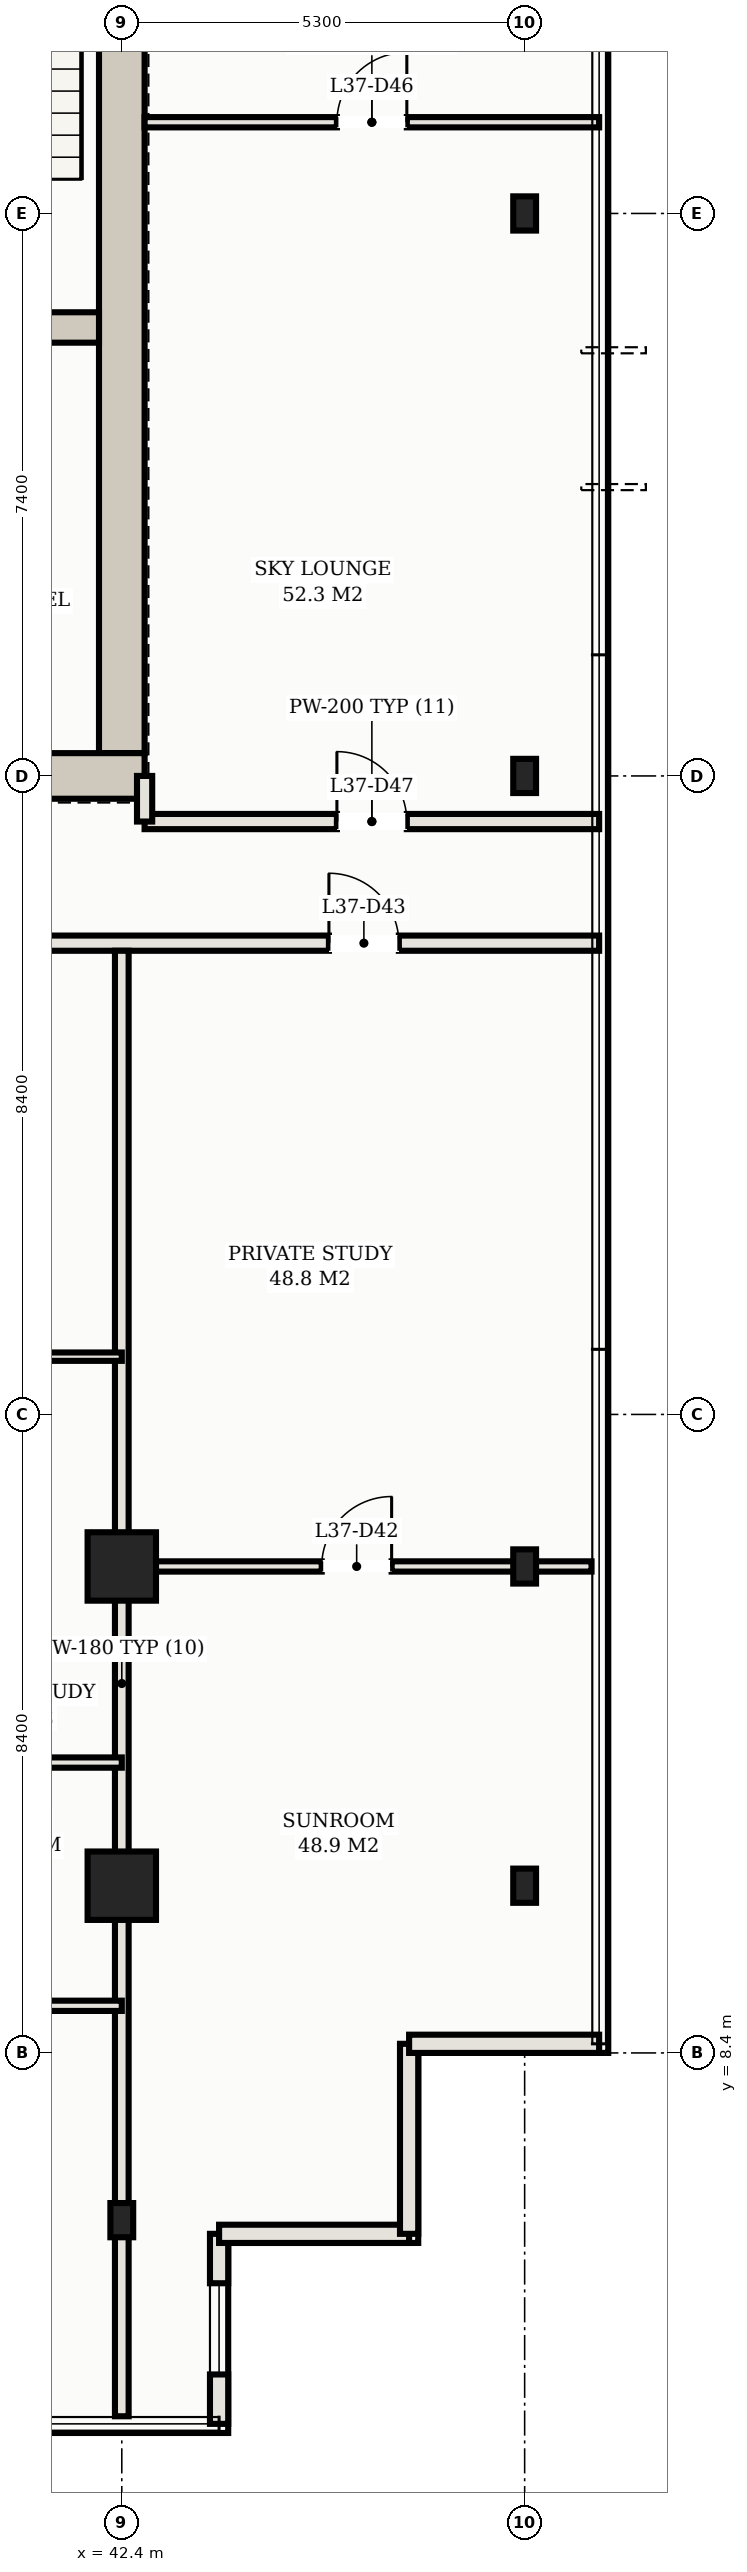
"""IFC4 building model, lengths in metres.
Left out: names, types, materials, properties, quantities, classifications, styles, units other than length and angle.
Written with IfcOpenShell. Run it as: python <this file> out.ifc"""

import sys

from ifc_helpers import new_model, si_unit, direction, frame, frame_2d, origin, origin_2d, place, context, subcontext, project, spatial, rectangle, hollow_rectangle, extrude, element, fill, save


model = new_model("IFC4")
c1 = context("Model", 3, precision=1e-05, world=origin(), true_north=direction((0.0, 1.0)))
c2 = subcontext(c1, "Body", "Model", "MODEL_VIEW")
j1 = project(units=[si_unit("LENGTHUNIT", "METRE"), si_unit("PLANEANGLEUNIT", "RADIAN")], contexts=[c1])
p1 = place(None, origin())
s1 = spatial("IfcSite", under=j1, at=p1, CompositionType="ELEMENT")
p2 = place(p1, origin())
s2 = spatial("IfcBuilding", under=s1, at=p2, CompositionType="ELEMENT")
p3 = place(p2, frame((0.0, 0.0, 139.2)))
s3 = spatial("IfcBuildingStorey", under=s2, at=p3, CompositionType="ELEMENT", Elevation=139.2)
p4 = place(p3, frame((42.4, 25.5, 0.0), z_axis=(0.0, 0.0, 1.0), x_axis=(0.0, 1.0, 0.0)))
e1 = element("IfcWall", 1, at=p4, inside=s3, PredefinedType="SHEAR", context=c2, shape_type="SweptSolid", body=[
    extrude(rectangle(XDim=14.2, YDim=0.6, at=frame_2d((7.1, 0.0))), origin(), (0.0, 0.0, 1.0), 3.1),
])
p5 = place(p3, frame((34.6, 25.2, 0.0), z_axis=(0.0, 0.0, 1.0), x_axis=(1.0, 0.0, 0.0)))
e2 = element("IfcWall", 2, at=p5, inside=s3, PredefinedType="SHEAR", context=c2, shape_type="SweptSolid", body=[
    extrude(rectangle(XDim=8.1, YDim=0.6, at=frame_2d((4.05, 0.0))), origin(), (0.0, 0.0, 1.0), 3.1),
])
p6 = place(p5, frame((0.65, 0.0, 0.0)))
e3 = element("IfcOpeningElement", 3, at=p6, cuts=e2, PredefinedType="OPENING", context=c2, shape_type="SweptSolid", body=[
    extrude(rectangle(XDim=1.25, YDim=2.2, at=frame_2d((0.625, 1.1))), frame((0.0, 0.31, 0.0), z_axis=(0.0, -1.0, 0.0), x_axis=(1.0, 0.0, 0.0)), (0.0, 0.0, 1.0), 0.62),
])
p7 = place(p3, frame((38.1, 31.1, 0.0), z_axis=(0.0, 0.0, 1.0), x_axis=(1.0, 0.0, 0.0)))
e4 = element("IfcWall", 4, at=p7, inside=s3, PredefinedType="SHEAR", context=c2, shape_type="SweptSolid", body=[
    extrude(rectangle(XDim=4.0, YDim=0.4, at=frame_2d((2.0, 0.0))), origin(), (0.0, 0.0, 1.0), 3.1),
])
for number, where, z_axis, x_axis in (
    (5, (42.4, 14.8, 0.0), (0.0, 0.0, 1.0), (1.0, 0.0, 0.0)),
    (6, (42.4, 10.6, 0.0), (0.0, 0.0, 1.0), (1.0, 0.0, 0.0)),
):
    element("IfcColumn", number, at=place(p3, frame(where, z_axis=z_axis, x_axis=x_axis)), inside=s3, PredefinedType="COLUMN", context=c2, shape_type="SweptSolid", body=[
        extrude(hollow_rectangle(XDim=0.9, YDim=0.9, WallThickness=0.032, at=origin_2d()), origin(), (0.0, 0.0, 1.0), 3.3),
    ])
for number, where, z_axis, x_axis in (
    (7, (42.4, 6.2, 0.0), (0.0, 0.0, 1.0), (1.0, 0.0, 0.0)),
    (8, (47.7, 10.6, 0.0), (0.0, 0.0, 1.0), (1.0, 0.0, 0.0)),
    (9, (47.7, 14.8, 0.0), (0.0, 0.0, 1.0), (1.0, 0.0, 0.0)),
    (10, (47.7, 25.2, 0.0), (0.0, 0.0, 1.0), (1.0, 0.0, 0.0)),
    (11, (47.7, 32.6, 0.0), (0.0, 0.0, 1.0), (1.0, 0.0, 0.0)),
):
    element("IfcColumn", number, at=place(p3, frame(where, z_axis=z_axis, x_axis=x_axis)), inside=s3, PredefinedType="COLUMN", context=c2, shape_type="SweptSolid", body=[
        extrude(hollow_rectangle(XDim=0.3, YDim=0.45, WallThickness=0.016, at=origin_2d()), origin(), (0.0, 0.0, 1.0), 3.3),
    ])
p8 = place(p3, frame((43.68, 3.52, 0.0), z_axis=(0.0, 0.0, 1.0), x_axis=(0.0, 1.0, 0.0)))
e12 = element("IfcWall", 12, at=p8, inside=s3, PredefinedType="SOLIDWALL", context=c2, shape_type="SweptSolid", body=[
    extrude(rectangle(XDim=2.5, YDim=0.24, at=frame_2d((1.25, 0.0))), origin(), (0.0, 0.0, 1.0), 3.1),
])
p9 = place(p8, frame((0.65, 0.0, 0.75)))
e13 = element("IfcOpeningElement", 13, at=p9, cuts=e12, PredefinedType="OPENING", context=c2, shape_type="SweptSolid", body=[
    extrude(rectangle(XDim=1.2, YDim=1.5, at=frame_2d((0.6, 0.75))), frame((0.0, 0.13, 0.0), z_axis=(0.0, -1.0, 0.0), x_axis=(1.0, 0.0, 0.0)), (0.0, 0.0, 1.0), 0.26),
])
for number, where, z_axis, x_axis in (
    (14, (43.68, 6.02, 0.0), (0.0, 0.0, 1.0), (1.0, 0.0, 0.0)),
    (15, (46.18, 6.02, 0.0), (0.0, 0.0, 1.0), (0.0, 1.0, 0.0)),
    (16, (46.18, 8.52, 0.0), (0.0, 0.0, 1.0), (1.0, 0.0, 0.0)),
):
    element("IfcWall", number, at=place(p3, frame(where, z_axis=z_axis, x_axis=x_axis)), inside=s3, PredefinedType="SOLIDWALL", context=c2, shape_type="SweptSolid", body=[
        extrude(rectangle(XDim=2.5, YDim=0.24, at=frame_2d((1.25, 0.0))), origin(), (0.0, 0.0, 1.0), 3.1),
    ])
p10 = place(p3, frame((4.32, 23.0, 0.0), z_axis=(0.0, 0.0, 1.0), x_axis=(1.0, 0.0, 0.0)))
e17 = element("IfcWall", 17, at=p10, inside=s3, PredefinedType="PARTITIONING", context=c2, shape_type="SweptSolid", body=[
    extrude(rectangle(XDim=44.36, YDim=0.2, at=frame_2d((22.18, 0.0))), origin(), (0.0, 0.0, 1.0), 2.38),
])
p11 = place(p10, frame((7.03, 0.0, 0.0)))
e18 = element("IfcOpeningElement", 18, at=p11, cuts=e17, PredefinedType="OPENING", context=c2, shape_type="SweptSolid", body=[
    extrude(rectangle(XDim=1.1, YDim=2.25, at=frame_2d((0.55, 1.125))), frame((0.0, 0.11, 0.0), z_axis=(0.0, -1.0, 0.0), x_axis=(1.0, 0.0, 0.0)), (0.0, 0.0, 1.0), 0.22),
])
p12 = place(p10, frame((12.83, 0.0, 0.0)))
e19 = element("IfcOpeningElement", 19, at=p12, cuts=e17, PredefinedType="OPENING", context=c2, shape_type="SweptSolid", body=[
    extrude(rectangle(XDim=1.1, YDim=2.25, at=frame_2d((0.55, 1.125))), frame((0.0, 0.11, 0.0), z_axis=(0.0, -1.0, 0.0), x_axis=(1.0, 0.0, 0.0)), (0.0, 0.0, 1.0), 0.22),
])
p13 = place(p10, frame((17.63, 0.0, 0.0)))
e20 = element("IfcOpeningElement", 20, at=p13, cuts=e17, PredefinedType="OPENING", context=c2, shape_type="SweptSolid", body=[
    extrude(rectangle(XDim=1.1, YDim=2.25, at=frame_2d((0.55, 1.125))), frame((0.0, 0.11, 0.0), z_axis=(0.0, -1.0, 0.0), x_axis=(1.0, 0.0, 0.0)), (0.0, 0.0, 1.0), 0.22),
])
p14 = place(p10, frame((28.23, 0.0, 0.0)))
e21 = element("IfcOpeningElement", 21, at=p14, cuts=e17, PredefinedType="OPENING", context=c2, shape_type="SweptSolid", body=[
    extrude(rectangle(XDim=1.1, YDim=2.25, at=frame_2d((0.55, 1.125))), frame((0.0, 0.11, 0.0), z_axis=(0.0, -1.0, 0.0), x_axis=(1.0, 0.0, 0.0)), (0.0, 0.0, 1.0), 0.22),
])
p15 = place(p10, frame((2.635, 0.0, 0.0)))
e22 = element("IfcOpeningElement", 22, at=p15, cuts=e17, PredefinedType="OPENING", context=c2, shape_type="SweptSolid", body=[
    extrude(rectangle(XDim=0.92, YDim=2.15, at=frame_2d((0.46, 1.075))), frame((0.0, 0.11, 0.0), z_axis=(0.0, -1.0, 0.0), x_axis=(1.0, 0.0, 0.0)), (0.0, 0.0, 1.0), 0.22),
])
p16 = place(p10, frame((40.805, 0.0, 0.0)))
e23 = element("IfcOpeningElement", 23, at=p16, cuts=e17, PredefinedType="OPENING", context=c2, shape_type="SweptSolid", body=[
    extrude(rectangle(XDim=0.92, YDim=2.15, at=frame_2d((0.46, 1.075))), frame((0.0, 0.11, 0.0), z_axis=(0.0, -1.0, 0.0), x_axis=(1.0, 0.0, 0.0)), (0.0, 0.0, 1.0), 0.22),
])
p17 = place(p3, frame((42.7, 24.6, 0.0), z_axis=(0.0, 0.0, 1.0), x_axis=(1.0, 0.0, 0.0)))
e24 = element("IfcWall", 24, at=p17, inside=s3, PredefinedType="PARTITIONING", context=c2, shape_type="SweptSolid", body=[
    extrude(rectangle(XDim=5.98, YDim=0.2, at=frame_2d((2.99, 0.0))), origin(), (0.0, 0.0, 1.0), 2.38),
])
p18 = place(p17, frame((2.53, 0.0, 0.0)))
e25 = element("IfcOpeningElement", 25, at=p18, cuts=e24, PredefinedType="OPENING", context=c2, shape_type="SweptSolid", body=[
    extrude(rectangle(XDim=0.92, YDim=2.15, at=frame_2d((0.46, 1.075))), frame((0.0, 0.11, 0.0), z_axis=(0.0, -1.0, 0.0), x_axis=(1.0, 0.0, 0.0)), (0.0, 0.0, 1.0), 0.22),
])
p19 = place(p3, frame((42.7, 24.6, 0.0), z_axis=(0.0, 0.0, 1.0), x_axis=(0.0, 1.0, 0.0)))
e26 = element("IfcWall", 26, at=p19, inside=s3, PredefinedType="PARTITIONING", context=c2, shape_type="SweptSolid", body=[
    extrude(rectangle(XDim=0.6, YDim=0.2, at=frame_2d((0.3, 0.0))), origin(), (0.0, 0.0, 1.0), 2.38),
])
p20 = place(p3, frame((42.4, 3.62, 0.0), z_axis=(0.0, 0.0, 1.0), x_axis=(0.0, 1.0, 0.0)))
e27 = element("IfcWall", 27, at=p20, inside=s3, PredefinedType="PARTITIONING", context=c2, shape_type="SweptSolid", body=[
    extrude(rectangle(XDim=19.28, YDim=0.18, at=frame_2d((9.64, 0.0))), origin(), (0.0, 0.0, 1.0), 2.38),
])
p21 = place(p3, frame((37.1, 9.02, 0.0), z_axis=(0.0, 0.0, 1.0), x_axis=(1.0, 0.0, 0.0)))
e28 = element("IfcWall", 28, at=p21, inside=s3, PredefinedType="PARTITIONING", context=c2, shape_type="SweptSolid", body=[
    extrude(rectangle(XDim=5.3, YDim=0.135, at=frame_2d((2.65, 0.0))), origin(), (0.0, 0.0, 1.0), 2.38),
])
p22 = place(p21, frame((0.8, 0.0, 0.0)))
e29 = element("IfcOpeningElement", 29, at=p22, cuts=e28, PredefinedType="OPENING", context=c2, shape_type="SweptSolid", body=[
    extrude(rectangle(XDim=0.95, YDim=2.15, at=frame_2d((0.475, 1.075))), frame((0.0, 0.078, 0.0), z_axis=(0.0, -1.0, 0.0), x_axis=(1.0, 0.0, 0.0)), (0.0, 0.0, 1.0), 0.155),
])
p23 = place(p21, frame((3.275, 0.0, 0.0)))
e30 = element("IfcOpeningElement", 30, at=p23, cuts=e28, PredefinedType="OPENING", context=c2, shape_type="SweptSolid", body=[
    extrude(rectangle(XDim=0.9, YDim=2.15, at=frame_2d((0.45, 1.075))), frame((0.0, 0.078, 0.0), z_axis=(0.0, -1.0, 0.0), x_axis=(1.0, 0.0, 0.0)), (0.0, 0.0, 1.0), 0.155),
])
p24 = place(p3, frame((39.25, 12.22, 0.0), z_axis=(0.0, 0.0, 1.0), x_axis=(1.0, 0.0, 0.0)))
e31 = element("IfcWall", 31, at=p24, inside=s3, PredefinedType="PARTITIONING", context=c2, shape_type="SweptSolid", body=[
    extrude(rectangle(XDim=3.15, YDim=0.135, at=frame_2d((1.575, 0.0))), origin(), (0.0, 0.0, 1.0), 2.38),
])
p25 = place(p3, frame((39.25, 17.56, 0.0), z_axis=(0.0, 0.0, 1.0), x_axis=(1.0, 0.0, 0.0)))
e32 = element("IfcWall", 32, at=p25, inside=s3, PredefinedType="MOVABLE", context=c2, shape_type="SweptSolid", body=[
    extrude(rectangle(XDim=3.15, YDim=0.11, at=frame_2d((1.575, 0.0))), origin(), (0.0, 0.0, 1.0), 2.38),
])
p26 = place(p25, frame((1.115, 0.0, 0.0)))
e33 = element("IfcOpeningElement", 33, at=p26, cuts=e32, PredefinedType="OPENING", context=c2, shape_type="SweptSolid", body=[
    extrude(rectangle(XDim=0.92, YDim=2.15, at=frame_2d((0.46, 1.075))), frame((0.0, 0.065, 0.0), z_axis=(0.0, -1.0, 0.0), x_axis=(1.0, 0.0, 0.0)), (0.0, 0.0, 1.0), 0.13),
])
p27 = place(p3, frame((42.4, 14.8, 0.0), z_axis=(0.0, 0.0, 1.0), x_axis=(1.0, 0.0, 0.0)))
e34 = element("IfcWall", 34, at=p27, inside=s3, PredefinedType="PARTITIONING", context=c2, shape_type="SweptSolid", body=[
    extrude(rectangle(XDim=6.18, YDim=0.135, at=frame_2d((3.09, 0.0))), origin(), (0.0, 0.0, 1.0), 2.38),
])
p28 = place(p27, frame((2.63, 0.0, 0.0)))
e35 = element("IfcOpeningElement", 35, at=p28, cuts=e34, PredefinedType="OPENING", context=c2, shape_type="SweptSolid", body=[
    extrude(rectangle(XDim=0.92, YDim=2.15, at=frame_2d((0.46, 1.075))), frame((0.0, 0.078, 0.0), z_axis=(0.0, -1.0, 0.0), x_axis=(1.0, 0.0, 0.0)), (0.0, 0.0, 1.0), 0.155),
])
p29 = place(p3, frame((42.7, 33.8, 0.0), z_axis=(0.0, 0.0, 1.0), x_axis=(1.0, 0.0, 0.0)))
e36 = element("IfcWall", 36, at=p29, inside=s3, PredefinedType="PARTITIONING", context=c2, shape_type="SweptSolid", body=[
    extrude(rectangle(XDim=5.98, YDim=0.135, at=frame_2d((2.99, 0.0))), origin(), (0.0, 0.0, 1.0), 2.38),
])
p30 = place(p29, frame((2.53, 0.0, 0.0)))
e37 = element("IfcOpeningElement", 37, at=p30, cuts=e36, PredefinedType="OPENING", context=c2, shape_type="SweptSolid", body=[
    extrude(rectangle(XDim=0.92, YDim=2.15, at=frame_2d((0.46, 1.075))), frame((0.0, 0.078, 0.0), z_axis=(0.0, -1.0, 0.0), x_axis=(1.0, 0.0, 0.0)), (0.0, 0.0, 1.0), 0.155),
])
p31 = place(p9, origin())
e38 = element("IfcWindow", 38, at=p31, inside=s3, PartitioningType="SINGLE_PANEL", PredefinedType="WINDOW", context=c2, shape_type="SweptSolid", body=[
    extrude(rectangle(XDim=1.2, YDim=1.5, at=frame_2d((0.6, 0.75))), frame((0.0, 0.03, 0.0), z_axis=(0.0, -1.0, 0.0), x_axis=(1.0, 0.0, 0.0)), (0.0, 0.0, 1.0), 0.06),
])
fill(e13, e38)
p32 = place(p28, origin())
e39 = element("IfcDoor", 39, at=p32, inside=s3, OperationType="SINGLE_SWING_RIGHT", PredefinedType="DOOR", context=c2, shape_type="SweptSolid", body=[
    extrude(rectangle(XDim=0.92, YDim=2.15, at=frame_2d((0.46, 1.075))), frame((0.0, 0.025, 0.0), z_axis=(0.0, -1.0, 0.0), x_axis=(1.0, 0.0, 0.0)), (0.0, 0.0, 1.0), 0.05),
])
fill(e35, e39)
p33 = place(p16, origin())
e40 = element("IfcDoor", 40, at=p33, inside=s3, OperationType="SINGLE_SWING_LEFT", PredefinedType="DOOR", context=c2, shape_type="SweptSolid", body=[
    extrude(rectangle(XDim=0.92, YDim=2.15, at=frame_2d((0.46, 1.075))), frame((0.0, 0.025, 0.0), z_axis=(0.0, -1.0, 0.0), x_axis=(1.0, 0.0, 0.0)), (0.0, 0.0, 1.0), 0.05),
])
fill(e23, e40)
p34 = place(p30, origin())
e41 = element("IfcDoor", 41, at=p34, inside=s3, OperationType="SINGLE_SWING_RIGHT", PredefinedType="DOOR", context=c2, shape_type="SweptSolid", body=[
    extrude(rectangle(XDim=0.92, YDim=2.15, at=frame_2d((0.46, 1.075))), frame((0.0, 0.025, 0.0), z_axis=(0.0, -1.0, 0.0), x_axis=(1.0, 0.0, 0.0)), (0.0, 0.0, 1.0), 0.05),
])
fill(e37, e41)
p35 = place(p18, origin())
e42 = element("IfcDoor", 42, at=p35, inside=s3, OperationType="SINGLE_SWING_LEFT", PredefinedType="DOOR", context=c2, shape_type="SweptSolid", body=[
    extrude(rectangle(XDim=0.92, YDim=2.15, at=frame_2d((0.46, 1.075))), frame((0.0, 0.025, 0.0), z_axis=(0.0, -1.0, 0.0), x_axis=(1.0, 0.0, 0.0)), (0.0, 0.0, 1.0), 0.05),
])
fill(e25, e42)
save(model, sys.argv[1])
